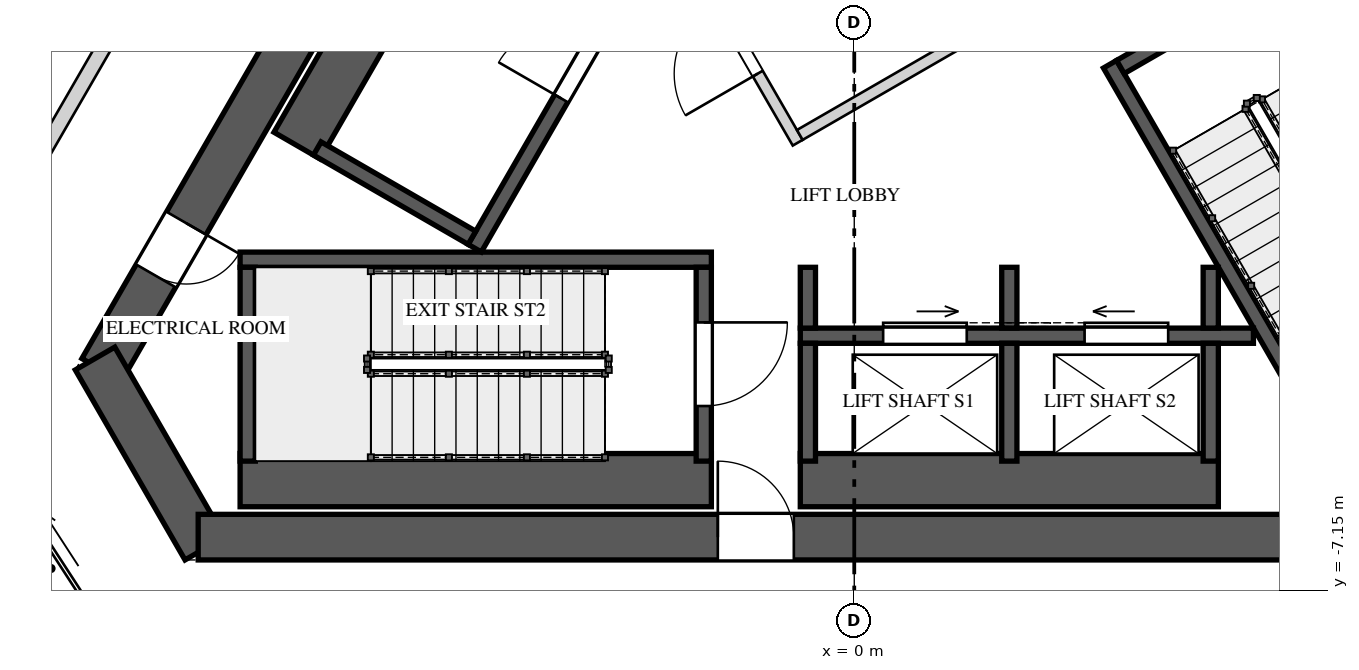
"""IFC4 building model, lengths in metres.
Left out: names, types, materials, properties, quantities, classifications, styles, units other than length and angle.
Written with IfcOpenShell. Run it as: python <this file> out.ifc"""

import sys

from ifc_helpers import new_model, si_unit, direction, frame, frame_2d, origin, place, context, subcontext, project, spatial, rectangle, extrude, element, fill, save


model = new_model("IFC4")
c1 = context("Model", 3, precision=1e-05, world=origin(), true_north=direction((0.0, 1.0)))
c2 = subcontext(c1, "Body", "Model", "MODEL_VIEW")
j1 = project(units=[si_unit("LENGTHUNIT", "METRE"), si_unit("PLANEANGLEUNIT", "RADIAN")], contexts=[c1])
p1 = place(None, origin())
s1 = spatial("IfcSite", under=j1, at=p1, CompositionType="ELEMENT")
p2 = place(p1, origin())
s2 = spatial("IfcBuilding", under=s1, at=p2, CompositionType="ELEMENT")
p3 = place(p2, frame((0.0, 0.0, 274.4)))
s3 = spatial("IfcBuildingStorey", under=s2, at=p3, CompositionType="ELEMENT", Elevation=274.4)
p4 = place(p3, frame((-1.27, 10.7, 0.0), z_axis=(0.0, 0.0, 1.0), x_axis=(-0.499999536116, -0.866025671608, 0.0)))
e1 = element("IfcWall", 1, at=p4, inside=s3, PredefinedType="SHEAR", context=c2, shape_type="SweptSolid", body=[
    extrude(rectangle(XDim=17.263, YDim=0.6, at=frame_2d((8.631, 0.0))), origin(), (0.0, 0.0, 1.0), 4.0),
])
p5 = place(p4, frame((6.836, 0.0, 0.0)))
e2 = element("IfcOpeningElement", 2, at=p5, cuts=e1, PredefinedType="OPENING", context=c2, shape_type="SweptSolid", body=[
    extrude(rectangle(XDim=1.0, YDim=2.4, at=frame_2d((0.5, 1.2))), frame((0.0, 0.31, 0.0), z_axis=(0.0, -1.0, 0.0), x_axis=(1.0, 0.0, 0.0)), (0.0, 0.0, 1.0), 0.62),
])
p6 = place(p4, frame((15.034, 0.0, 0.0)))
e3 = element("IfcOpeningElement", 3, at=p6, cuts=e1, PredefinedType="OPENING", context=c2, shape_type="SweptSolid", body=[
    extrude(rectangle(XDim=0.8, YDim=2.1, at=frame_2d((0.4, 1.05))), frame((0.0, 0.31, 0.0), z_axis=(0.0, -1.0, 0.0), x_axis=(1.0, 0.0, 0.0)), (0.0, 0.0, 1.0), 0.62),
])
p7 = place(p3, frame((-9.988, -4.1, 0.0), z_axis=(0.0, 0.0, 1.0), x_axis=(0.499995765644, -0.866027848477, 0.0)))
e4 = element("IfcWall", 4, at=p7, inside=s3, PredefinedType="SHEAR", context=c2, shape_type="SweptSolid", body=[
    extrude(rectangle(XDim=2.887, YDim=0.6, at=frame_2d((1.443, 0.0))), origin(), (0.0, 0.0, 1.0), 4.0),
])
p8 = place(p3, frame((-8.631, -6.45, 0.0), z_axis=(0.0, 0.0, 1.0), x_axis=(1.0, 0.0, 0.0)))
e5 = element("IfcWall", 5, at=p8, inside=s3, PredefinedType="SHEAR", context=c2, shape_type="SweptSolid", body=[
    extrude(rectangle(XDim=17.263, YDim=0.6, at=frame_2d((8.631, 0.0))), origin(), (0.0, 0.0, 1.0), 4.0),
])
p9 = place(p8, frame((6.836, 0.0, 0.0)))
e6 = element("IfcOpeningElement", 6, at=p9, cuts=e5, PredefinedType="OPENING", context=c2, shape_type="SweptSolid", body=[
    extrude(rectangle(XDim=1.0, YDim=2.4, at=frame_2d((0.5, 1.2))), frame((0.0, 0.31, 0.0), z_axis=(0.0, -1.0, 0.0), x_axis=(1.0, 0.0, 0.0)), (0.0, 0.0, 1.0), 0.62),
])
p10 = place(p3, frame((9.902, -4.25, 0.0), z_axis=(0.0, 0.0, 1.0), x_axis=(-0.499999536116, 0.866025671608, 0.0)))
e7 = element("IfcWall", 7, at=p10, inside=s3, PredefinedType="SHEAR", context=c2, shape_type="SweptSolid", body=[
    extrude(rectangle(XDim=17.263, YDim=0.6, at=frame_2d((8.631, 0.0))), origin(), (0.0, 0.0, 1.0), 4.0),
])
p11 = place(p10, frame((6.906, 0.0, 0.0)))
e8 = element("IfcOpeningElement", 8, at=p11, cuts=e7, PredefinedType="OPENING", context=c2, shape_type="SweptSolid", body=[
    extrude(rectangle(XDim=1.0, YDim=2.4, at=frame_2d((0.5, 1.2))), frame((0.0, 0.31, 0.0), z_axis=(0.0, -1.0, 0.0), x_axis=(1.0, 0.0, 0.0)), (0.0, 0.0, 1.0), 0.62),
])
p12 = place(p3, frame((-11.19, -5.904, 0.0), z_axis=(0.0, 0.0, 1.0), x_axis=(0.544631777146, -0.838675281216, 0.0)))
e9 = element("IfcWall", 9, at=p12, inside=s3, PredefinedType="SOLIDWALL", context=c2, shape_type="SweptSolid", body=[
    extrude(rectangle(XDim=2.287, YDim=0.3, at=frame_2d((1.143, 0.0))), origin(), (0.0, 0.0, 1.0), 3.3),
])
p13 = place(p12, frame((0.293, 0.0, 0.0)))
e10 = element("IfcOpeningElement", 10, at=p13, cuts=e9, PredefinedType="OPENING", context=c2, shape_type="SweptSolid", body=[
    extrude(rectangle(XDim=1.7, YDim=2.5, at=frame_2d((0.85, 1.25))), frame((0.0, 0.16, 0.0), z_axis=(0.0, -1.0, 0.0), x_axis=(1.0, 0.0, 0.0)), (0.0, 0.0, 1.0), 0.32),
])
p14 = place(p3, frame((-8.08, -5.7, 0.0), z_axis=(0.0, 0.0, 1.0), x_axis=(1.0, 0.0, 0.0)))
e11 = element("IfcWall", 11, at=p14, inside=s3, PredefinedType="SOLIDWALL", context=c2, shape_type="SweptSolid", body=[
    extrude(rectangle(XDim=6.2, YDim=0.7, at=frame_2d((3.1, 0.0))), origin(), (0.0, 0.0, 1.0), 3.65),
])
p15 = place(p3, frame((-8.08, -2.8, 0.0), z_axis=(0.0, 0.0, 1.0), x_axis=(1.0, 0.0, 0.0)))
e12 = element("IfcWall", 12, at=p15, inside=s3, PredefinedType="SOLIDWALL", context=c2, shape_type="SweptSolid", body=[
    extrude(rectangle(XDim=6.2, YDim=0.2, at=frame_2d((3.1, 0.0))), origin(), (0.0, 0.0, 1.0), 3.65),
])
p16 = place(p3, frame((-7.98, -2.9, 0.0), z_axis=(0.0, 0.0, 1.0), x_axis=(0.0, -1.0, 0.0)))
e13 = element("IfcWall", 13, at=p16, inside=s3, PredefinedType="SOLIDWALL", context=c2, shape_type="SweptSolid", body=[
    extrude(rectangle(XDim=2.55, YDim=0.2, at=frame_2d((1.275, 0.0))), origin(), (0.0, 0.0, 1.0), 3.65),
])
p17 = place(p3, frame((-1.98, -2.9, 0.0), z_axis=(0.0, 0.0, 1.0), x_axis=(0.0, -1.0, 0.0)))
e14 = element("IfcWall", 14, at=p17, inside=s3, PredefinedType="SOLIDWALL", context=c2, shape_type="SweptSolid", body=[
    extrude(rectangle(XDim=2.55, YDim=0.2, at=frame_2d((1.275, 0.0))), origin(), (0.0, 0.0, 1.0), 3.65),
])
p18 = place(p17, frame((0.725, 0.0, 0.0)))
e15 = element("IfcOpeningElement", 15, at=p18, cuts=e14, PredefinedType="OPENING", context=c2, shape_type="SweptSolid", body=[
    extrude(rectangle(XDim=1.1, YDim=2.4, at=frame_2d((0.55, 1.2))), frame((0.0, 0.11, 0.0), z_axis=(0.0, -1.0, 0.0), x_axis=(1.0, 0.0, 0.0)), (0.0, 0.0, 1.0), 0.22),
])
p19 = place(p3, frame((8.976, -4.147, 0.0), z_axis=(0.0, 0.0, 1.0), x_axis=(-0.49998037582, 0.866036733513, 0.0)))
e16 = element("IfcWall", 16, at=p19, inside=s3, PredefinedType="SOLIDWALL", context=c2, shape_type="SweptSolid", body=[
    extrude(rectangle(XDim=6.2, YDim=0.7, at=frame_2d((3.1, 0.0))), origin(), (0.0, 0.0, 1.0), 3.65),
])
p20 = place(p3, frame((6.465, -5.597, 0.0), z_axis=(0.0, 0.0, 1.0), x_axis=(-0.49998037582, 0.866036733513, 0.0)))
e17 = element("IfcWall", 17, at=p20, inside=s3, PredefinedType="SOLIDWALL", context=c2, shape_type="SweptSolid", body=[
    extrude(rectangle(XDim=6.2, YDim=0.2, at=frame_2d((3.1, 0.0))), origin(), (0.0, 0.0, 1.0), 3.65),
])
p21 = place(p3, frame((3.501, -0.265, 0.0), z_axis=(0.0, 0.0, 1.0), x_axis=(0.866030925526, 0.499990435942, 0.0)))
e18 = element("IfcWall", 18, at=p21, inside=s3, PredefinedType="SOLIDWALL", context=c2, shape_type="SweptSolid", body=[
    extrude(rectangle(XDim=2.55, YDim=0.2, at=frame_2d((1.275, 0.0))), origin(), (0.0, 0.0, 1.0), 3.65),
])
p22 = place(p21, frame((0.725, 0.0, 0.0)))
e19 = element("IfcOpeningElement", 19, at=p22, cuts=e18, PredefinedType="OPENING", context=c2, shape_type="SweptSolid", body=[
    extrude(rectangle(XDim=1.1, YDim=2.4, at=frame_2d((0.55, 1.2))), frame((0.0, 0.11, 0.0), z_axis=(0.0, -1.0, 0.0), x_axis=(1.0, 0.0, 0.0)), (0.0, 0.0, 1.0), 0.22),
])
p23 = place(p3, frame((-4.993, -2.648, 0.0), z_axis=(0.0, 0.0, 1.0), x_axis=(0.499996545922, 0.866027397988, 0.0)))
e20 = element("IfcWall", 20, at=p23, inside=s3, PredefinedType="SOLIDWALL", context=c2, shape_type="SweptSolid", body=[
    extrude(rectangle(XDim=5.5, YDim=0.2, at=frame_2d((2.75, 0.0))), origin(), (0.0, 0.0, 1.0), 3.65),
])
p24 = place(p23, frame((2.275, 0.0, 0.0)))
e21 = element("IfcOpeningElement", 21, at=p24, cuts=e20, PredefinedType="OPENING", context=c2, shape_type="SweptSolid", body=[
    extrude(rectangle(XDim=0.95, YDim=2.4, at=frame_2d((0.475, 1.2))), frame((0.0, 0.11, 0.0), z_axis=(0.0, -1.0, 0.0), x_axis=(1.0, 0.0, 0.0)), (0.0, 0.0, 1.0), 0.22),
])
p25 = place(p3, frame((-4.581, 3.465, 0.0), z_axis=(0.0, 0.0, 1.0), x_axis=(-0.499996545922, -0.866027397988, 0.0)))
e22 = element("IfcWall", 22, at=p25, inside=s3, PredefinedType="SOLIDWALL", context=c2, shape_type="SweptSolid", body=[
    extrude(rectangle(XDim=5.5, YDim=0.7, at=frame_2d((2.75, 0.0))), origin(), (0.0, 0.0, 1.0), 3.65),
])
p26 = place(p3, frame((-5.03, -2.512, 0.0), z_axis=(0.0, 0.0, 1.0), x_axis=(-0.866016039709, 0.500016218704, 0.0)))
e23 = element("IfcWall", 23, at=p26, inside=s3, PredefinedType="SOLIDWALL", context=c2, shape_type="SweptSolid", body=[
    extrude(rectangle(XDim=2.35, YDim=0.2, at=frame_2d((1.175, 0.0))), origin(), (0.0, 0.0, 1.0), 3.65),
])
p27 = place(p3, frame((-0.71, -3.8, 0.0), z_axis=(0.0, 0.0, 1.0), x_axis=(1.0, 0.0, 0.0)))
e24 = element("IfcWall", 24, at=p27, inside=s3, PredefinedType="SOLIDWALL", context=c2, shape_type="SweptSolid", body=[
    extrude(rectangle(XDim=5.961, YDim=0.2, at=frame_2d((2.981, 0.0))), origin(), (0.0, 0.0, 1.0), 3.65),
])
p28 = place(p27, frame((1.09, 0.0, 0.0)))
e25 = element("IfcOpeningElement", 25, at=p28, cuts=e24, PredefinedType="OPENING", context=c2, shape_type="SweptSolid", body=[
    extrude(rectangle(XDim=1.1, YDim=2.1, at=frame_2d((0.55, 1.05))), frame((0.0, 0.11, 0.0), z_axis=(0.0, -1.0, 0.0), x_axis=(1.0, 0.0, 0.0)), (0.0, 0.0, 1.0), 0.22),
])
p29 = place(p27, frame((3.74, 0.0, 0.0)))
e26 = element("IfcOpeningElement", 26, at=p29, cuts=e24, PredefinedType="OPENING", context=c2, shape_type="SweptSolid", body=[
    extrude(rectangle(XDim=1.1, YDim=2.1, at=frame_2d((0.55, 1.05))), frame((0.0, 0.11, 0.0), z_axis=(0.0, -1.0, 0.0), x_axis=(1.0, 0.0, 0.0)), (0.0, 0.0, 1.0), 0.22),
])
p30 = place(p3, frame((-0.71, -5.7, 0.0), z_axis=(0.0, 0.0, 1.0), x_axis=(1.0, 0.0, 0.0)))
e27 = element("IfcWall", 27, at=p30, inside=s3, PredefinedType="SOLIDWALL", context=c2, shape_type="SweptSolid", body=[
    extrude(rectangle(XDim=5.5, YDim=0.7, at=frame_2d((2.75, 0.0))), origin(), (0.0, 0.0, 1.0), 3.65),
])
p31 = place(p3, frame((-0.61, -3.9, 0.0), z_axis=(0.0, 0.0, 1.0), x_axis=(0.0, -1.0, 0.0)))
e28 = element("IfcWall", 28, at=p31, inside=s3, PredefinedType="SOLIDWALL", context=c2, shape_type="SweptSolid", body=[
    extrude(rectangle(XDim=1.55, YDim=0.2, at=frame_2d((0.775, 0.0))), origin(), (0.0, 0.0, 1.0), 3.65),
])
p32 = place(p3, frame((-0.61, -2.9, 0.0), z_axis=(0.0, 0.0, 1.0), x_axis=(0.0, -1.0, 0.0)))
e29 = element("IfcWall", 29, at=p32, inside=s3, PredefinedType="SOLIDWALL", context=c2, shape_type="SweptSolid", body=[
    extrude(rectangle(XDim=0.8, YDim=0.2, at=frame_2d((0.4, 0.0))), origin(), (0.0, 0.0, 1.0), 3.65),
])
p33 = place(p3, frame((2.04, -3.9, 0.0), z_axis=(0.0, 0.0, 1.0), x_axis=(0.0, -1.0, 0.0)))
e30 = element("IfcWall", 30, at=p33, inside=s3, PredefinedType="SOLIDWALL", context=c2, shape_type="SweptSolid", body=[
    extrude(rectangle(XDim=1.55, YDim=0.2, at=frame_2d((0.775, 0.0))), origin(), (0.0, 0.0, 1.0), 3.65),
])
p34 = place(p3, frame((2.04, -2.9, 0.0), z_axis=(0.0, 0.0, 1.0), x_axis=(0.0, -1.0, 0.0)))
e31 = element("IfcWall", 31, at=p34, inside=s3, PredefinedType="SOLIDWALL", context=c2, shape_type="SweptSolid", body=[
    extrude(rectangle(XDim=0.8, YDim=0.2, at=frame_2d((0.4, 0.0))), origin(), (0.0, 0.0, 1.0), 3.65),
])
p35 = place(p3, frame((4.69, -3.9, 0.0), z_axis=(0.0, 0.0, 1.0), x_axis=(0.0, -1.0, 0.0)))
e32 = element("IfcWall", 32, at=p35, inside=s3, PredefinedType="SOLIDWALL", context=c2, shape_type="SweptSolid", body=[
    extrude(rectangle(XDim=1.55, YDim=0.2, at=frame_2d((0.775, 0.0))), origin(), (0.0, 0.0, 1.0), 3.65),
])
p36 = place(p3, frame((4.69, -2.9, 0.0), z_axis=(0.0, 0.0, 1.0), x_axis=(0.0, -1.0, 0.0)))
e33 = element("IfcWall", 33, at=p36, inside=s3, PredefinedType="SOLIDWALL", context=c2, shape_type="SweptSolid", body=[
    extrude(rectangle(XDim=0.8, YDim=0.2, at=frame_2d((0.4, 0.0))), origin(), (0.0, 0.0, 1.0), 3.65),
])
p37 = place(p3, frame((-0.744, -1.261, 0.0), z_axis=(0.0, 0.0, 1.0), x_axis=(-0.500004234368, 0.866022959057, 0.0)))
e34 = element("IfcWall", 34, at=p37, inside=s3, PredefinedType="PARTITIONING", context=c2, shape_type="SweptSolid", body=[
    extrude(rectangle(XDim=3.125, YDim=0.15, at=frame_2d((1.562, 0.0))), origin(), (0.0, 0.0, 1.0), 3.65),
])
p38 = place(p37, frame((1.05, 0.0, 0.0)))
e35 = element("IfcOpeningElement", 35, at=p38, cuts=e34, PredefinedType="OPENING", context=c2, shape_type="SweptSolid", body=[
    extrude(rectangle(XDim=1.1, YDim=2.4, at=frame_2d((0.55, 1.2))), frame((0.0, 0.085, 0.0), z_axis=(0.0, -1.0, 0.0), x_axis=(1.0, 0.0, 0.0)), (0.0, 0.0, 1.0), 0.17),
])
p39 = place(p3, frame((-0.717, -1.159, 0.0), z_axis=(0.0, 0.0, 1.0), x_axis=(0.866008176907, 0.50002983664, 0.0)))
e36 = element("IfcWall", 36, at=p39, inside=s3, PredefinedType="PARTITIONING", context=c2, shape_type="SweptSolid", body=[
    extrude(rectangle(XDim=3.3, YDim=0.15, at=frame_2d((1.65, 0.0))), origin(), (0.0, 0.0, 1.0), 3.65),
])
p40 = place(p3, frame((-11.732, -3.221, 0.0), z_axis=(0.0, 0.0, 1.0), x_axis=(0.500007683529, 0.866020967652, 0.0)))
e37 = element("IfcWall", 37, at=p40, inside=s3, PredefinedType="SOLIDWALL", context=c2, shape_type="SweptSolid", body=[
    extrude(rectangle(XDim=4.717, YDim=0.2, at=frame_2d((2.359, 0.0))), origin(), (0.0, 0.0, 1.0), 3.65),
])
p41 = place(p13, origin())
e38 = element("IfcDoor", 38, at=p41, inside=s3, OperationType="SLIDING_TO_LEFT", PredefinedType="DOOR", context=c2, shape_type="SweptSolid", body=[
    extrude(rectangle(XDim=1.7, YDim=2.5, at=frame_2d((0.85, 1.25))), frame((0.0, 0.025, 0.0), z_axis=(0.0, -1.0, 0.0), x_axis=(1.0, 0.0, 0.0)), (0.0, 0.0, 1.0), 0.05),
])
fill(e10, e38)
p42 = place(p18, origin())
e39 = element("IfcDoor", 39, at=p42, inside=s3, OperationType="SINGLE_SWING_LEFT", PredefinedType="DOOR", context=c2, shape_type="SweptSolid", body=[
    extrude(rectangle(XDim=1.1, YDim=2.4, at=frame_2d((0.55, 1.2))), frame((0.0, 0.025, 0.0), z_axis=(0.0, -1.0, 0.0), x_axis=(1.0, 0.0, 0.0)), (0.0, 0.0, 1.0), 0.05),
])
fill(e15, e39)
p43 = place(p24, origin())
e40 = element("IfcDoor", 40, at=p43, inside=s3, OperationType="SINGLE_SWING_LEFT", PredefinedType="DOOR", context=c2, shape_type="SweptSolid", body=[
    extrude(rectangle(XDim=0.95, YDim=2.4, at=frame_2d((0.475, 1.2))), frame((0.0, 0.025, 0.0), z_axis=(0.0, -1.0, 0.0), x_axis=(1.0, 0.0, 0.0)), (0.0, 0.0, 1.0), 0.05),
])
fill(e21, e40)
p44 = place(p28, origin())
e41 = element("IfcDoor", 41, at=p44, inside=s3, OperationType="SLIDING_TO_RIGHT", PredefinedType="DOOR", context=c2, shape_type="SweptSolid", body=[
    extrude(rectangle(XDim=1.1, YDim=2.1, at=frame_2d((0.55, 1.05))), frame((0.0, 0.025, 0.0), z_axis=(0.0, -1.0, 0.0), x_axis=(1.0, 0.0, 0.0)), (0.0, 0.0, 1.0), 0.05),
])
fill(e25, e41)
p45 = place(p29, origin())
e42 = element("IfcDoor", 42, at=p45, inside=s3, OperationType="SLIDING_TO_LEFT", PredefinedType="DOOR", context=c2, shape_type="SweptSolid", body=[
    extrude(rectangle(XDim=1.1, YDim=2.1, at=frame_2d((0.55, 1.05))), frame((0.0, 0.025, 0.0), z_axis=(0.0, -1.0, 0.0), x_axis=(1.0, 0.0, 0.0)), (0.0, 0.0, 1.0), 0.05),
])
fill(e26, e42)
p46 = place(p38, origin())
e43 = element("IfcDoor", 43, at=p46, inside=s3, OperationType="SINGLE_SWING_RIGHT", PredefinedType="DOOR", context=c2, shape_type="SweptSolid", body=[
    extrude(rectangle(XDim=1.1, YDim=2.4, at=frame_2d((0.55, 1.2))), frame((0.0, 0.025, 0.0), z_axis=(0.0, -1.0, 0.0), x_axis=(1.0, 0.0, 0.0)), (0.0, 0.0, 1.0), 0.05),
])
fill(e35, e43)
p47 = place(p9, origin())
e44 = element("IfcDoor", 44, at=p47, inside=s3, OperationType="SINGLE_SWING_RIGHT", PredefinedType="DOOR", context=c2, shape_type="SweptSolid", body=[
    extrude(rectangle(XDim=1.0, YDim=2.4, at=frame_2d((0.5, 1.2))), frame((0.0, 0.025, 0.0), z_axis=(0.0, -1.0, 0.0), x_axis=(1.0, 0.0, 0.0)), (0.0, 0.0, 1.0), 0.05),
])
fill(e6, e44)
p48 = place(p6, origin())
e45 = element("IfcDoor", 45, at=p48, inside=s3, OperationType="SINGLE_SWING_RIGHT", PredefinedType="DOOR", context=c2, shape_type="SweptSolid", body=[
    extrude(rectangle(XDim=0.8, YDim=2.1, at=frame_2d((0.4, 1.05))), frame((0.0, 0.025, 0.0), z_axis=(0.0, -1.0, 0.0), x_axis=(1.0, 0.0, 0.0)), (0.0, 0.0, 1.0), 0.05),
])
fill(e3, e45)
save(model, sys.argv[1])
